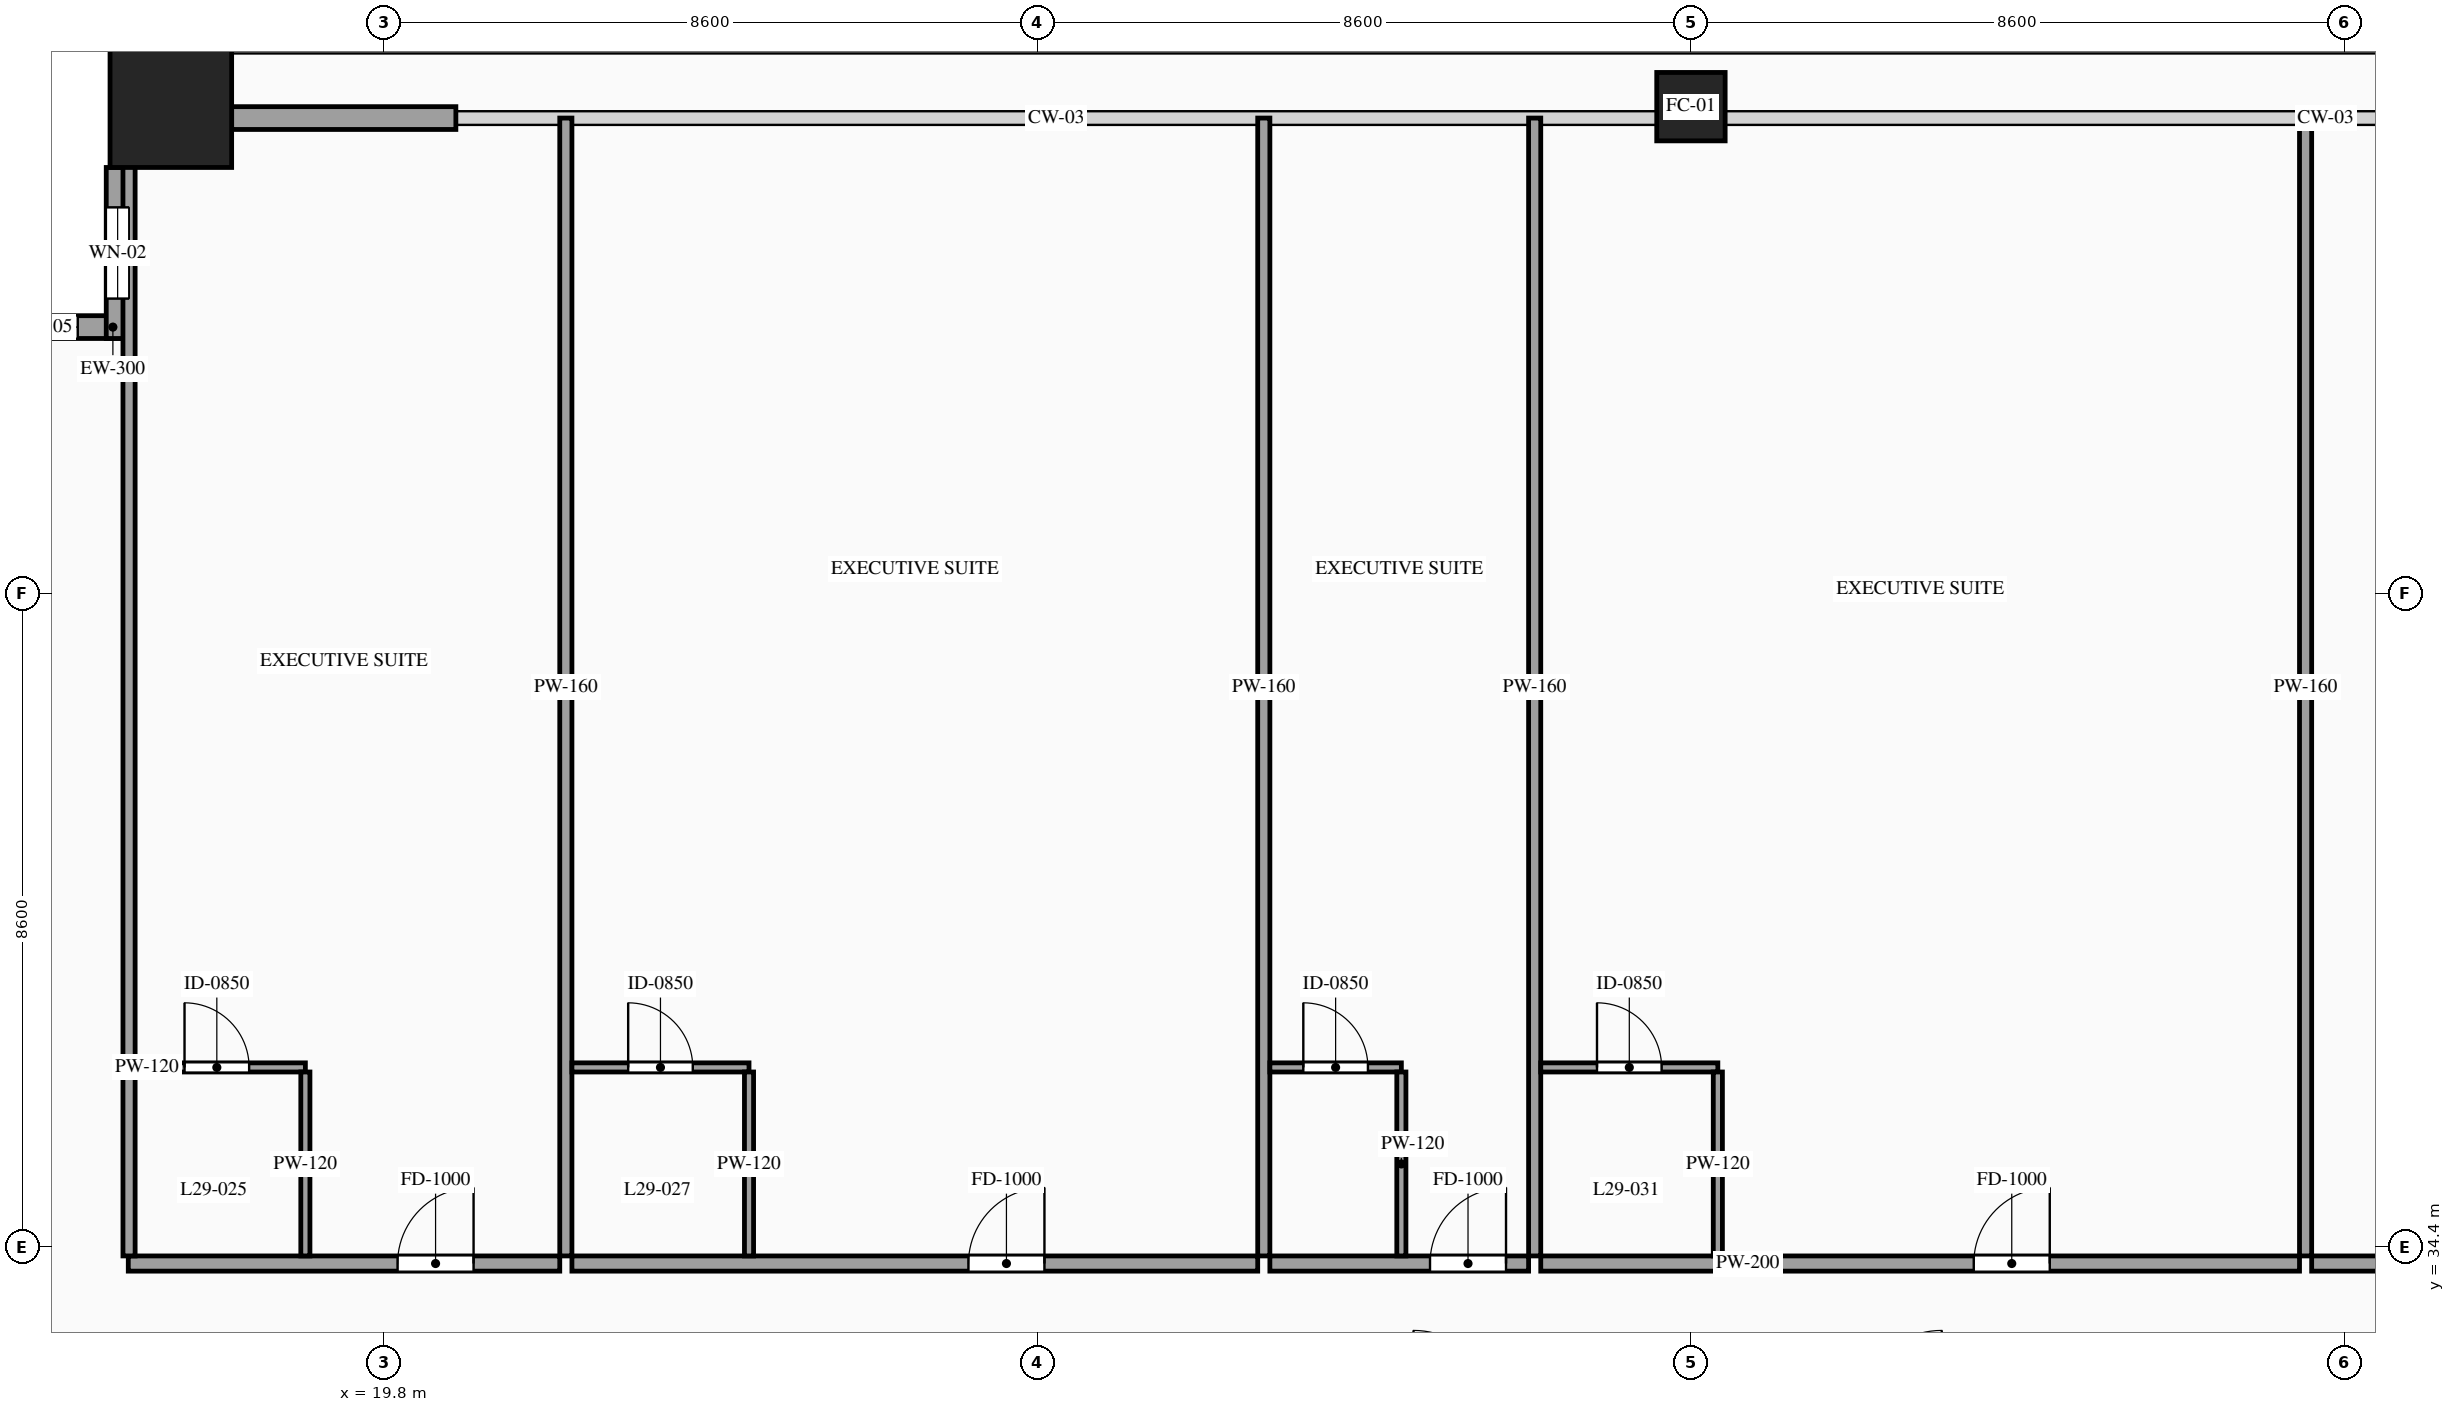
"""IFC4 building model, lengths in metres.
Left out: names, types, materials, properties, quantities, classifications, styles, units other than length and angle.
Written with IfcOpenShell. Run it as: python <this file> out.ifc"""

import sys

from ifc_helpers import new_model, si_unit, direction, frame, frame_2d, origin, origin_2d, place, context, subcontext, project, spatial, rectangle, hollow_rectangle, extrude, source, transform, mapped, element, fill, save


model = new_model("IFC4")
c1 = context("Model", 3, precision=1e-05, world=origin(), true_north=direction((0.0, 1.0)))
c2 = subcontext(c1, "Body", "Model", "MODEL_VIEW")
j1 = project(units=[si_unit("LENGTHUNIT", "METRE"), si_unit("PLANEANGLEUNIT", "RADIAN")], contexts=[c1])
p1 = place(None, origin())
s1 = spatial("IfcSite", under=j1, at=p1, CompositionType="ELEMENT")
p2 = place(p1, origin())
s2 = spatial("IfcBuilding", under=s1, at=p2, CompositionType="ELEMENT")
p3 = place(p2, frame((0.0, 0.0, 111.8)))
s3 = spatial("IfcBuildingStorey", under=s2, at=p3, CompositionType="ELEMENT", Elevation=111.8)
m1 = source(origin(), c2, "Body", "SweptSolid", [
    extrude(hollow_rectangle(XDim=1.6, YDim=1.6, WallThickness=0.07, at=origin_2d()), origin(), (0.0, 0.0, 1.0), 3.6),
])
p4 = place(p3, frame((17.0, 49.4, 0.0), z_axis=(0.0, 0.0, 1.0), x_axis=(1.0, 0.0, 0.0)))
e1 = element("IfcColumn", 1, at=p4, inside=s3, PredefinedType="COLUMN", context=c2, shape_type="MappedRepresentation", body=[
    mapped(m1, transform((0.0, 0.0, 0.0), scale=1.0)),
])
m2 = source(origin(), c2, "Body", "SweptSolid", [
    extrude(hollow_rectangle(XDim=0.9, YDim=0.9, WallThickness=0.042, at=origin_2d()), origin(), (0.0, 0.0, 1.0), 3.6),
])
p5 = place(p3, frame((37.0, 49.4, 0.0), z_axis=(0.0, 0.0, 1.0), x_axis=(1.0, 0.0, 0.0)))
e2 = element("IfcColumn", 2, at=p5, inside=s3, PredefinedType="COLUMN", context=c2, shape_type="MappedRepresentation", body=[
    mapped(m2, transform((0.0, 0.0, 0.0), scale=1.0)),
])
p6 = place(p3, frame((16.45, 46.5, 0.0), z_axis=(0.0, 0.0, 1.0), x_axis=(-1.0, 0.0, 0.0)))
e3 = element("IfcWall", 3, at=p6, inside=s3, PredefinedType="SOLIDWALL", context=c2, shape_type="SweptSolid", body=[
    extrude(rectangle(XDim=2.25, YDim=0.3, at=frame_2d((1.125, 0.0))), origin(), (0.0, 0.0, 1.0), 3.38),
])
p7 = place(p6, frame((0.675, 0.0, 0.85)))
e4 = element("IfcOpeningElement", 4, at=p7, cuts=e3, PredefinedType="OPENING", context=c2, shape_type="SweptSolid", body=[
    extrude(rectangle(XDim=0.9, YDim=1.5, at=frame_2d((0.45, 0.75))), frame((0.0, 0.165, 0.0), z_axis=(0.0, -1.0, 0.0), x_axis=(1.0, 0.0, 0.0)), (0.0, 0.0, 1.0), 0.33),
])
p8 = place(p3, frame((16.3, 48.6, 0.0), z_axis=(0.0, 0.0, 1.0), x_axis=(0.0, -1.0, 0.0)))
e5 = element("IfcWall", 5, at=p8, inside=s3, PredefinedType="SOLIDWALL", context=c2, shape_type="SweptSolid", body=[
    extrude(rectangle(XDim=2.25, YDim=0.3, at=frame_2d((1.125, 0.0))), origin(), (0.0, 0.0, 1.0), 3.38),
])
p9 = place(p8, frame((0.525, 0.0, 0.85)))
e6 = element("IfcOpeningElement", 6, at=p9, cuts=e5, PredefinedType="OPENING", context=c2, shape_type="SweptSolid", body=[
    extrude(rectangle(XDim=1.2, YDim=2.1, at=frame_2d((0.6, 1.05))), frame((0.0, 0.165, 0.0), z_axis=(0.0, -1.0, 0.0), x_axis=(1.0, 0.0, 0.0)), (0.0, 0.0, 1.0), 0.33),
])
m3 = source(origin(), c2, "Body", "SweptSolid", [
    extrude(rectangle(XDim=2.95, YDim=0.3, at=frame_2d((1.475, 0.0))), origin(), (0.0, 0.0, 1.0), 2.775),
])
p10 = place(p3, frame((17.8, 49.25, 0.0), z_axis=(0.0, 0.0, 1.0), x_axis=(1.0, 0.0, 0.0)))
e7 = element("IfcWall", 7, at=p10, inside=s3, PredefinedType="SOLIDWALL", context=c2, shape_type="MappedRepresentation", body=[
    mapped(m3, transform((0.0, 0.0, 0.0), scale=1.0)),
])
p11 = place(p3, frame((16.44, 34.18, 0.0), z_axis=(0.0, 0.0, 1.0), x_axis=(1.0, 0.0, 0.0)))
e8 = element("IfcWall", 8, at=p11, inside=s3, PredefinedType="PARTITIONING", context=c2, shape_type="SweptSolid", body=[
    extrude(rectangle(XDim=5.677, YDim=0.2, at=frame_2d((2.838, 0.0))), origin(), (0.0, 0.0, 1.0), 3.38),
])
p12 = place(p11, frame((3.543, 0.0, 0.0)))
e9 = element("IfcOpeningElement", 9, at=p12, cuts=e8, PredefinedType="OPENING", context=c2, shape_type="SweptSolid", body=[
    extrude(rectangle(XDim=1.0, YDim=2.2, at=frame_2d((0.5, 1.1))), frame((0.0, 0.115, 0.0), z_axis=(0.0, -1.0, 0.0), x_axis=(1.0, 0.0, 0.0)), (0.0, 0.0, 1.0), 0.23),
])
m4 = source(origin(), c2, "Body", "SweptSolid", [
    extrude(rectangle(XDim=14.97, YDim=0.16, at=frame_2d((7.485, 0.0))), origin(), (0.0, 0.0, 1.0), 3.38),
])
p13 = place(p3, frame((22.197, 34.28, 0.0), z_axis=(0.0, 0.0, 1.0), x_axis=(0.0, 1.0, 0.0)))
e10 = element("IfcWall", 10, at=p13, inside=s3, PredefinedType="PARTITIONING", context=c2, shape_type="MappedRepresentation", body=[
    mapped(m4, transform((0.0, 0.0, 0.0), scale=1.0)),
])
p14 = place(p3, frame((16.44, 36.76, 0.0), z_axis=(0.0, 0.0, 1.0), x_axis=(1.0, 0.0, 0.0)))
e11 = element("IfcWall", 11, at=p14, inside=s3, PredefinedType="PARTITIONING", context=c2, shape_type="SweptSolid", body=[
    extrude(rectangle(XDim=2.33, YDim=0.12, at=frame_2d((1.165, 0.0))), origin(), (0.0, 0.0, 1.0), 3.38),
])
p15 = place(p14, frame((0.74, 0.0, 0.0)))
e12 = element("IfcOpeningElement", 12, at=p15, cuts=e11, PredefinedType="OPENING", context=c2, shape_type="SweptSolid", body=[
    extrude(rectangle(XDim=0.85, YDim=2.1, at=frame_2d((0.425, 1.05))), frame((0.0, 0.075, 0.0), z_axis=(0.0, -1.0, 0.0), x_axis=(1.0, 0.0, 0.0)), (0.0, 0.0, 1.0), 0.15),
])
m5 = source(origin(), c2, "Body", "SweptSolid", [
    extrude(rectangle(XDim=2.42, YDim=0.12, at=frame_2d((1.21, 0.0))), origin(), (0.0, 0.0, 1.0), 3.38),
])
p16 = place(p3, frame((18.77, 34.28, 0.0), z_axis=(0.0, 0.0, 1.0), x_axis=(0.0, 1.0, 0.0)))
e13 = element("IfcWall", 13, at=p16, inside=s3, PredefinedType="PARTITIONING", context=c2, shape_type="MappedRepresentation", body=[
    mapped(m5, transform((0.0, 0.0, 0.0), scale=1.0)),
])
p17 = place(p3, frame((22.277, 34.18, 0.0), z_axis=(0.0, 0.0, 1.0), x_axis=(1.0, 0.0, 0.0)))
e14 = element("IfcWall", 14, at=p17, inside=s3, PredefinedType="PARTITIONING", context=c2, shape_type="SweptSolid", body=[
    extrude(rectangle(XDim=9.023, YDim=0.2, at=frame_2d((4.511, 0.0))), origin(), (0.0, 0.0, 1.0), 3.38),
])
p18 = place(p17, frame((5.217, 0.0, 0.0)))
e15 = element("IfcOpeningElement", 15, at=p18, cuts=e14, PredefinedType="OPENING", context=c2, shape_type="SweptSolid", body=[
    extrude(rectangle(XDim=1.0, YDim=2.2, at=frame_2d((0.5, 1.1))), frame((0.0, 0.115, 0.0), z_axis=(0.0, -1.0, 0.0), x_axis=(1.0, 0.0, 0.0)), (0.0, 0.0, 1.0), 0.23),
])
p19 = place(p3, frame((31.38, 34.28, 0.0), z_axis=(0.0, 0.0, 1.0), x_axis=(0.0, 1.0, 0.0)))
e16 = element("IfcWall", 16, at=p19, inside=s3, PredefinedType="PARTITIONING", context=c2, shape_type="MappedRepresentation", body=[
    mapped(m4, transform((0.0, 0.0, 0.0), scale=1.0)),
])
p20 = place(p3, frame((22.277, 36.76, 0.0), z_axis=(0.0, 0.0, 1.0), x_axis=(1.0, 0.0, 0.0)))
e17 = element("IfcWall", 17, at=p20, inside=s3, PredefinedType="PARTITIONING", context=c2, shape_type="SweptSolid", body=[
    extrude(rectangle(XDim=2.33, YDim=0.12, at=frame_2d((1.165, 0.0))), origin(), (0.0, 0.0, 1.0), 3.38),
])
p21 = place(p20, frame((0.74, 0.0, 0.0)))
e18 = element("IfcOpeningElement", 18, at=p21, cuts=e17, PredefinedType="OPENING", context=c2, shape_type="SweptSolid", body=[
    extrude(rectangle(XDim=0.85, YDim=2.1, at=frame_2d((0.425, 1.05))), frame((0.0, 0.075, 0.0), z_axis=(0.0, -1.0, 0.0), x_axis=(1.0, 0.0, 0.0)), (0.0, 0.0, 1.0), 0.15),
])
p22 = place(p3, frame((24.607, 34.28, 0.0), z_axis=(0.0, 0.0, 1.0), x_axis=(0.0, 1.0, 0.0)))
e19 = element("IfcWall", 19, at=p22, inside=s3, PredefinedType="PARTITIONING", context=c2, shape_type="MappedRepresentation", body=[
    mapped(m5, transform((0.0, 0.0, 0.0), scale=1.0)),
])
p23 = place(p3, frame((31.46, 34.18, 0.0), z_axis=(0.0, 0.0, 1.0), x_axis=(1.0, 0.0, 0.0)))
e20 = element("IfcWall", 20, at=p23, inside=s3, PredefinedType="PARTITIONING", context=c2, shape_type="SweptSolid", body=[
    extrude(rectangle(XDim=3.404, YDim=0.2, at=frame_2d((1.702, 0.0))), origin(), (0.0, 0.0, 1.0), 3.38),
])
p24 = place(p23, frame((2.107, 0.0, 0.0)))
e21 = element("IfcOpeningElement", 21, at=p24, cuts=e20, PredefinedType="OPENING", context=c2, shape_type="SweptSolid", body=[
    extrude(rectangle(XDim=1.0, YDim=2.2, at=frame_2d((0.5, 1.1))), frame((0.0, 0.115, 0.0), z_axis=(0.0, -1.0, 0.0), x_axis=(1.0, 0.0, 0.0)), (0.0, 0.0, 1.0), 0.23),
])
p25 = place(p3, frame((34.944, 34.28, 0.0), z_axis=(0.0, 0.0, 1.0), x_axis=(0.0, 1.0, 0.0)))
e22 = element("IfcWall", 22, at=p25, inside=s3, PredefinedType="PARTITIONING", context=c2, shape_type="MappedRepresentation", body=[
    mapped(m4, transform((0.0, 0.0, 0.0), scale=1.0)),
])
p26 = place(p3, frame((31.46, 36.76, 0.0), z_axis=(0.0, 0.0, 1.0), x_axis=(1.0, 0.0, 0.0)))
e23 = element("IfcWall", 23, at=p26, inside=s3, PredefinedType="PARTITIONING", context=c2, shape_type="SweptSolid", body=[
    extrude(rectangle(XDim=1.73, YDim=0.12, at=frame_2d((0.865, 0.0))), origin(), (0.0, 0.0, 1.0), 3.38),
])
p27 = place(p26, frame((0.44, 0.0, 0.0)))
e24 = element("IfcOpeningElement", 24, at=p27, cuts=e23, PredefinedType="OPENING", context=c2, shape_type="SweptSolid", body=[
    extrude(rectangle(XDim=0.85, YDim=2.1, at=frame_2d((0.425, 1.05))), frame((0.0, 0.075, 0.0), z_axis=(0.0, -1.0, 0.0), x_axis=(1.0, 0.0, 0.0)), (0.0, 0.0, 1.0), 0.15),
])
p28 = place(p3, frame((33.19, 34.28, 0.0), z_axis=(0.0, 0.0, 1.0), x_axis=(0.0, 1.0, 0.0)))
e25 = element("IfcWall", 25, at=p28, inside=s3, PredefinedType="PARTITIONING", context=c2, shape_type="MappedRepresentation", body=[
    mapped(m5, transform((0.0, 0.0, 0.0), scale=1.0)),
])
p29 = place(p3, frame((35.024, 34.18, 0.0), z_axis=(0.0, 0.0, 1.0), x_axis=(1.0, 0.0, 0.0)))
e26 = element("IfcWall", 26, at=p29, inside=s3, PredefinedType="PARTITIONING", context=c2, shape_type="SweptSolid", body=[
    extrude(rectangle(XDim=9.983, YDim=0.2, at=frame_2d((4.992, 0.0))), origin(), (0.0, 0.0, 1.0), 3.38),
])
p30 = place(p29, frame((5.697, 0.0, 0.0)))
e27 = element("IfcOpeningElement", 27, at=p30, cuts=e26, PredefinedType="OPENING", context=c2, shape_type="SweptSolid", body=[
    extrude(rectangle(XDim=1.0, YDim=2.2, at=frame_2d((0.5, 1.1))), frame((0.0, 0.115, 0.0), z_axis=(0.0, -1.0, 0.0), x_axis=(1.0, 0.0, 0.0)), (0.0, 0.0, 1.0), 0.23),
])
p31 = place(p3, frame((45.087, 34.28, 0.0), z_axis=(0.0, 0.0, 1.0), x_axis=(0.0, 1.0, 0.0)))
e28 = element("IfcWall", 28, at=p31, inside=s3, PredefinedType="PARTITIONING", context=c2, shape_type="MappedRepresentation", body=[
    mapped(m4, transform((0.0, 0.0, 0.0), scale=1.0)),
])
p32 = place(p3, frame((35.024, 36.76, 0.0), z_axis=(0.0, 0.0, 1.0), x_axis=(1.0, 0.0, 0.0)))
e29 = element("IfcWall", 29, at=p32, inside=s3, PredefinedType="PARTITIONING", context=c2, shape_type="SweptSolid", body=[
    extrude(rectangle(XDim=2.33, YDim=0.12, at=frame_2d((1.165, 0.0))), origin(), (0.0, 0.0, 1.0), 3.38),
])
p33 = place(p32, frame((0.74, 0.0, 0.0)))
e30 = element("IfcOpeningElement", 30, at=p33, cuts=e29, PredefinedType="OPENING", context=c2, shape_type="SweptSolid", body=[
    extrude(rectangle(XDim=0.85, YDim=2.1, at=frame_2d((0.425, 1.05))), frame((0.0, 0.075, 0.0), z_axis=(0.0, -1.0, 0.0), x_axis=(1.0, 0.0, 0.0)), (0.0, 0.0, 1.0), 0.15),
])
p34 = place(p3, frame((37.354, 34.28, 0.0), z_axis=(0.0, 0.0, 1.0), x_axis=(0.0, 1.0, 0.0)))
e31 = element("IfcWall", 31, at=p34, inside=s3, PredefinedType="PARTITIONING", context=c2, shape_type="MappedRepresentation", body=[
    mapped(m5, transform((0.0, 0.0, 0.0), scale=1.0)),
])
p35 = place(p3, frame((45.167, 34.18, 0.0), z_axis=(0.0, 0.0, 1.0), x_axis=(1.0, 0.0, 0.0)))
e32 = element("IfcWall", 32, at=p35, inside=s3, PredefinedType="PARTITIONING", context=c2, shape_type="SweptSolid", body=[
    extrude(rectangle(XDim=3.404, YDim=0.2, at=frame_2d((1.702, 0.0))), origin(), (0.0, 0.0, 1.0), 3.38),
])
p36 = place(p35, frame((1.202, 0.0, 0.0)))
e33 = element("IfcOpeningElement", 33, at=p36, cuts=e32, PredefinedType="OPENING", context=c2, shape_type="SweptSolid", body=[
    extrude(rectangle(XDim=1.0, YDim=2.2, at=frame_2d((0.5, 1.1))), frame((0.0, 0.115, 0.0), z_axis=(0.0, -1.0, 0.0), x_axis=(1.0, 0.0, 0.0)), (0.0, 0.0, 1.0), 0.23),
])
m6 = source(origin(), c2, "Body", "SweptSolid", [
    extrude(rectangle(XDim=14.82, YDim=0.16, at=frame_2d((7.41, 0.0))), origin(), (0.0, 0.0, 1.0), 3.38),
])
p37 = place(p3, frame((16.45, 34.28, 0.0), z_axis=(0.0, 0.0, 1.0), x_axis=(0.0, 1.0, 0.0)))
e34 = element("IfcWall", 34, at=p37, inside=s3, PredefinedType="PARTITIONING", context=c2, shape_type="MappedRepresentation", body=[
    mapped(m6, transform((0.0, 0.0, 0.0), scale=1.0)),
])
m7 = source(origin(), c2, "Body", "SweptSolid", [
    extrude(rectangle(XDim=0.9, YDim=1.5, at=frame_2d((0.45, 0.75))), frame((0.0, 0.03, 0.0), z_axis=(0.0, -1.0, 0.0), x_axis=(1.0, 0.0, 0.0)), (0.0, 0.0, 1.0), 0.06),
])
p38 = place(p7, origin())
e35 = element("IfcWindow", 35, at=p38, inside=s3, PartitioningType="SINGLE_PANEL", PredefinedType="WINDOW", context=c2, shape_type="MappedRepresentation", body=[
    mapped(m7, transform((0.0, 0.0, 0.0), scale=1.0)),
])
fill(e4, e35)
m8 = source(origin(), c2, "Body", "SweptSolid", [
    extrude(rectangle(XDim=1.2, YDim=2.1, at=frame_2d((0.6, 1.05))), frame((0.0, 0.03, 0.0), z_axis=(0.0, -1.0, 0.0), x_axis=(1.0, 0.0, 0.0)), (0.0, 0.0, 1.0), 0.06),
])
p39 = place(p9, origin())
e36 = element("IfcWindow", 36, at=p39, inside=s3, PartitioningType="SINGLE_PANEL", PredefinedType="WINDOW", context=c2, shape_type="MappedRepresentation", body=[
    mapped(m8, transform((0.0, 0.0, 0.0), scale=1.0)),
])
fill(e6, e36)
m9 = source(origin(), c2, "Body", "SweptSolid", [
    extrude(rectangle(XDim=1.0, YDim=2.2, at=frame_2d((0.5, 1.1))), frame((0.0, 0.025, 0.0), z_axis=(0.0, -1.0, 0.0), x_axis=(1.0, 0.0, 0.0)), (0.0, 0.0, 1.0), 0.05),
])
p40 = place(p12, origin())
e37 = element("IfcDoor", 37, at=p40, inside=s3, OperationType="SINGLE_SWING_RIGHT", PredefinedType="DOOR", context=c2, shape_type="MappedRepresentation", body=[
    mapped(m9, transform((0.0, 0.0, 0.0), scale=1.0)),
])
fill(e9, e37)
m10 = source(origin(), c2, "Body", "SweptSolid", [
    extrude(rectangle(XDim=0.85, YDim=2.1, at=frame_2d((0.425, 1.05))), frame((0.0, 0.025, 0.0), z_axis=(0.0, -1.0, 0.0), x_axis=(1.0, 0.0, 0.0)), (0.0, 0.0, 1.0), 0.05),
])
p41 = place(p15, origin())
e38 = element("IfcDoor", 38, at=p41, inside=s3, OperationType="SINGLE_SWING_LEFT", PredefinedType="DOOR", context=c2, shape_type="MappedRepresentation", body=[
    mapped(m10, transform((0.0, 0.0, 0.0), scale=1.0)),
])
fill(e12, e38)
p42 = place(p18, origin())
e39 = element("IfcDoor", 39, at=p42, inside=s3, OperationType="SINGLE_SWING_RIGHT", PredefinedType="DOOR", context=c2, shape_type="MappedRepresentation", body=[
    mapped(m9, transform((0.0, 0.0, 0.0), scale=1.0)),
])
fill(e15, e39)
p43 = place(p21, origin())
e40 = element("IfcDoor", 40, at=p43, inside=s3, OperationType="SINGLE_SWING_LEFT", PredefinedType="DOOR", context=c2, shape_type="MappedRepresentation", body=[
    mapped(m10, transform((0.0, 0.0, 0.0), scale=1.0)),
])
fill(e18, e40)
p44 = place(p24, origin())
e41 = element("IfcDoor", 41, at=p44, inside=s3, OperationType="SINGLE_SWING_RIGHT", PredefinedType="DOOR", context=c2, shape_type="MappedRepresentation", body=[
    mapped(m9, transform((0.0, 0.0, 0.0), scale=1.0)),
])
fill(e21, e41)
p45 = place(p27, origin())
e42 = element("IfcDoor", 42, at=p45, inside=s3, OperationType="SINGLE_SWING_LEFT", PredefinedType="DOOR", context=c2, shape_type="MappedRepresentation", body=[
    mapped(m10, transform((0.0, 0.0, 0.0), scale=1.0)),
])
fill(e24, e42)
p46 = place(p30, origin())
e43 = element("IfcDoor", 43, at=p46, inside=s3, OperationType="SINGLE_SWING_RIGHT", PredefinedType="DOOR", context=c2, shape_type="MappedRepresentation", body=[
    mapped(m9, transform((0.0, 0.0, 0.0), scale=1.0)),
])
fill(e27, e43)
p47 = place(p33, origin())
e44 = element("IfcDoor", 44, at=p47, inside=s3, OperationType="SINGLE_SWING_LEFT", PredefinedType="DOOR", context=c2, shape_type="MappedRepresentation", body=[
    mapped(m10, transform((0.0, 0.0, 0.0), scale=1.0)),
])
fill(e30, e44)
save(model, sys.argv[1])
